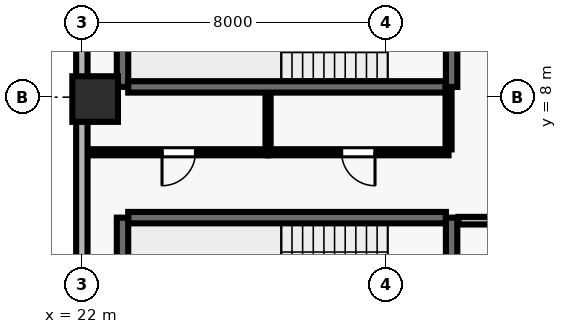
"""IFC4 building model, lengths in metres.
Left out: names, types, materials, properties, quantities, classifications, styles, units other than length and angle.
Written with IfcOpenShell. Run it as: python <this file> out.ifc"""

import sys

from ifc_helpers import new_model, si_unit, direction, frame, frame_2d, origin, origin_2d, place, context, subcontext, project, spatial, rectangle, extrude, element, fill, save


model = new_model("IFC4")
c1 = context("Model", 3, precision=1e-05, world=origin(), true_north=direction((0.0, 1.0)))
c2 = subcontext(c1, "Body", "Model", "MODEL_VIEW")
j1 = project(units=[si_unit("LENGTHUNIT", "METRE"), si_unit("PLANEANGLEUNIT", "RADIAN")], contexts=[c1])
p1 = place(None, origin())
s1 = spatial("IfcSite", under=j1, at=p1, CompositionType="ELEMENT")
p2 = place(p1, origin())
s2 = spatial("IfcBuilding", under=s1, at=p2, CompositionType="ELEMENT")
p3 = place(p2, frame((0.0, 0.0, 138.5)))
s3 = spatial("IfcBuildingStorey", under=s2, at=p3, CompositionType="ELEMENT", Elevation=138.5)
p4 = place(p3, frame((22.35, 7.95, 0.0), z_axis=(0.0, 0.0, 1.0), x_axis=(1.0, 0.0, 0.0)))
e1 = element("IfcColumn", 1, at=p4, inside=s3, PredefinedType="COLUMN", context=c2, shape_type="SweptSolid", body=[
    extrude(rectangle(XDim=1.2, YDim=1.2, at=origin_2d()), origin(), (0.0, 0.0, 1.0), 3.9),
])
p5 = place(p3, frame((22.0, 46.1, 0.0), z_axis=(0.0, 0.0, 1.0), x_axis=(0.0, -1.0, 0.0)))
e2 = element("IfcWall", 2, at=p5, inside=s3, PredefinedType="SOLIDWALL", context=c2, shape_type="SweptSolid", body=[
    extrude(rectangle(XDim=43.6, YDim=0.3, at=frame_2d((21.8, 0.0))), origin(), (0.0, 0.0, 1.0), 3.69),
])
p6 = place(p5, frame((12.7, 0.0, 0.0)))
e3 = element("IfcOpeningElement", 3, at=p6, cuts=e2, PredefinedType="OPENING", context=c2, shape_type="SweptSolid", body=[
    extrude(rectangle(XDim=1.0, YDim=2.2, at=frame_2d((0.5, 1.1))), frame((0.0, 0.16, 0.0), z_axis=(0.0, -1.0, 0.0), x_axis=(1.0, 0.0, 0.0)), (0.0, 0.0, 1.0), 0.32),
])
p7 = place(p5, frame((1.825, 0.0, 0.9)))
e4 = element("IfcOpeningElement", 4, at=p7, cuts=e2, PredefinedType="OPENING", context=c2, shape_type="SweptSolid", body=[
    extrude(rectangle(XDim=1.8, YDim=2.2, at=frame_2d((0.9, 1.1))), frame((0.0, 0.16, 0.0), z_axis=(0.0, -1.0, 0.0), x_axis=(1.0, 0.0, 0.0)), (0.0, 0.0, 1.0), 0.32),
])
p8 = place(p5, frame((17.725, 0.0, 0.9)))
e5 = element("IfcOpeningElement", 5, at=p8, cuts=e2, PredefinedType="OPENING", context=c2, shape_type="SweptSolid", body=[
    extrude(rectangle(XDim=1.8, YDim=2.2, at=frame_2d((0.9, 1.1))), frame((0.0, 0.16, 0.0), z_axis=(0.0, -1.0, 0.0), x_axis=(1.0, 0.0, 0.0)), (0.0, 0.0, 1.0), 0.32),
])
p9 = place(p5, frame((23.625, 0.0, 0.9)))
e6 = element("IfcOpeningElement", 6, at=p9, cuts=e2, PredefinedType="OPENING", context=c2, shape_type="SweptSolid", body=[
    extrude(rectangle(XDim=1.8, YDim=2.2, at=frame_2d((0.9, 1.1))), frame((0.0, 0.16, 0.0), z_axis=(0.0, -1.0, 0.0), x_axis=(1.0, 0.0, 0.0)), (0.0, 0.0, 1.0), 0.32),
])
p10 = place(p5, frame((28.625, 0.0, 0.9)))
e7 = element("IfcOpeningElement", 7, at=p10, cuts=e2, PredefinedType="OPENING", context=c2, shape_type="SweptSolid", body=[
    extrude(rectangle(XDim=1.8, YDim=2.2, at=frame_2d((0.9, 1.1))), frame((0.0, 0.16, 0.0), z_axis=(0.0, -1.0, 0.0), x_axis=(1.0, 0.0, 0.0)), (0.0, 0.0, 1.0), 0.32),
])
p11 = place(p5, frame((34.525, 0.0, 0.9)))
e8 = element("IfcOpeningElement", 8, at=p11, cuts=e2, PredefinedType="OPENING", context=c2, shape_type="SweptSolid", body=[
    extrude(rectangle(XDim=1.8, YDim=2.2, at=frame_2d((0.9, 1.1))), frame((0.0, 0.16, 0.0), z_axis=(0.0, -1.0, 0.0), x_axis=(1.0, 0.0, 0.0)), (0.0, 0.0, 1.0), 0.32),
])
p12 = place(p3, frame((31.58, 4.83, 0.0), z_axis=(0.0, 0.0, 1.0), x_axis=(-1.0, 0.0, 0.0)))
e9 = element("IfcWall", 9, at=p12, inside=s3, PredefinedType="SHEAR", context=c2, shape_type="SweptSolid", body=[
    extrude(rectangle(XDim=8.36, YDim=0.3, at=frame_2d((4.18, 0.0))), origin(), (0.0, 0.0, 1.0), 3.69),
])
p13 = place(p3, frame((23.07, 4.83, 0.0), z_axis=(0.0, 0.0, 1.0), x_axis=(0.0, -1.0, 0.0)))
e10 = element("IfcWall", 10, at=p13, inside=s3, PredefinedType="SHEAR", context=c2, shape_type="SweptSolid", body=[
    extrude(rectangle(XDim=3.51, YDim=0.3, at=frame_2d((1.755, 0.0))), origin(), (0.0, 0.0, 1.0), 3.69),
])
p14 = place(p3, frame((31.73, 0.96, 0.0), z_axis=(0.0, 0.0, 1.0), x_axis=(0.0, 1.0, 0.0)))
e11 = element("IfcWall", 11, at=p14, inside=s3, PredefinedType="SHEAR", context=c2, shape_type="SweptSolid", body=[
    extrude(rectangle(XDim=3.87, YDim=0.3, at=frame_2d((1.935, 0.0))), origin(), (0.0, 0.0, 1.0), 3.69),
])
p15 = place(p14, frame((1.54, 0.0, 0.0)))
e12 = element("IfcOpeningElement", 12, at=p15, cuts=e11, PredefinedType="OPENING", context=c2, shape_type="SweptSolid", body=[
    extrude(rectangle(XDim=1.15, YDim=2.15, at=frame_2d((0.575, 1.075))), frame((0.0, 0.16, 0.0), z_axis=(0.0, -1.0, 0.0), x_axis=(1.0, 0.0, 0.0)), (0.0, 0.0, 1.0), 0.32),
])
p16 = place(p3, frame((23.07, 11.78, 0.0), z_axis=(0.0, 0.0, 1.0), x_axis=(0.0, -1.0, 0.0)))
e13 = element("IfcWall", 13, at=p16, inside=s3, PredefinedType="SHEAR", context=c2, shape_type="SweptSolid", body=[
    extrude(rectangle(XDim=3.51, YDim=0.3, at=frame_2d((1.755, 0.0))), origin(), (0.0, 0.0, 1.0), 3.69),
])
p17 = place(p3, frame((23.22, 8.27, 0.0), z_axis=(0.0, 0.0, 1.0), x_axis=(1.0, 0.0, 0.0)))
e14 = element("IfcWall", 14, at=p17, inside=s3, PredefinedType="SHEAR", context=c2, shape_type="SweptSolid", body=[
    extrude(rectangle(XDim=8.36, YDim=0.3, at=frame_2d((4.18, 0.0))), origin(), (0.0, 0.0, 1.0), 3.69),
])
p18 = place(p3, frame((31.73, 8.27, 0.0), z_axis=(0.0, 0.0, 1.0), x_axis=(0.0, 1.0, 0.0)))
e15 = element("IfcWall", 15, at=p18, inside=s3, PredefinedType="SHEAR", context=c2, shape_type="SweptSolid", body=[
    extrude(rectangle(XDim=3.51, YDim=0.3, at=frame_2d((1.755, 0.0))), origin(), (0.0, 0.0, 1.0), 3.69),
])
p19 = place(p18, frame((1.18, 0.0, 0.0)))
e16 = element("IfcOpeningElement", 16, at=p19, cuts=e15, PredefinedType="OPENING", context=c2, shape_type="SweptSolid", body=[
    extrude(rectangle(XDim=1.15, YDim=2.15, at=frame_2d((0.575, 1.075))), frame((0.0, 0.16, 0.0), z_axis=(0.0, -1.0, 0.0), x_axis=(1.0, 0.0, 0.0)), (0.0, 0.0, 1.0), 0.32),
])
p20 = place(p3, frame((26.9, 6.55, 0.0), z_axis=(0.0, 0.0, 1.0), x_axis=(-1.0, 0.0, 0.0)))
e17 = element("IfcWall", 17, at=p20, inside=s3, PredefinedType="PARTITIONING", context=c2, shape_type="SweptSolid", body=[
    extrude(rectangle(XDim=4.7, YDim=0.16, at=frame_2d((2.35, 0.0))), origin(), (0.0, 0.0, 1.0), 3.69),
])
p21 = place(p20, frame((1.91, 0.0, 0.0)))
e18 = element("IfcOpeningElement", 18, at=p21, cuts=e17, PredefinedType="OPENING", context=c2, shape_type="SweptSolid", body=[
    extrude(rectangle(XDim=0.88, YDim=2.1, at=frame_2d((0.44, 1.05))), frame((0.0, 0.09, 0.0), z_axis=(0.0, -1.0, 0.0), x_axis=(1.0, 0.0, 0.0)), (0.0, 0.0, 1.0), 0.18),
])
p22 = place(p3, frame((31.65, 6.55, 0.0), z_axis=(0.0, 0.0, 1.0), x_axis=(-1.0, 0.0, 0.0)))
e19 = element("IfcWall", 19, at=p22, inside=s3, PredefinedType="PARTITIONING", context=c2, shape_type="SweptSolid", body=[
    extrude(rectangle(XDim=4.75, YDim=0.16, at=frame_2d((2.375, 0.0))), origin(), (0.0, 0.0, 1.0), 3.69),
])
p23 = place(p22, frame((1.935, 0.0, 0.0)))
e20 = element("IfcOpeningElement", 20, at=p23, cuts=e19, PredefinedType="OPENING", context=c2, shape_type="SweptSolid", body=[
    extrude(rectangle(XDim=0.88, YDim=2.1, at=frame_2d((0.44, 1.05))), frame((0.0, 0.09, 0.0), z_axis=(0.0, -1.0, 0.0), x_axis=(1.0, 0.0, 0.0)), (0.0, 0.0, 1.0), 0.18),
])
p24 = place(p3, frame((35.02, 4.75, 0.0), z_axis=(0.0, 0.0, 1.0), x_axis=(-1.0, 0.0, 0.0)))
e21 = element("IfcWall", 21, at=p24, inside=s3, PredefinedType="SOLIDWALL", context=c2, shape_type="SweptSolid", body=[
    extrude(rectangle(XDim=3.11, YDim=0.2, at=frame_2d((1.555, 0.0))), origin(), (0.0, 0.0, 1.0), 3.69),
])
p25 = place(p24, frame((1.03, 0.0, 0.0)))
e22 = element("IfcOpeningElement", 22, at=p25, cuts=e21, PredefinedType="OPENING", context=c2, shape_type="SweptSolid", body=[
    extrude(rectangle(XDim=1.05, YDim=2.15, at=frame_2d((0.525, 1.075))), frame((0.0, 0.11, 0.0), z_axis=(0.0, -1.0, 0.0), x_axis=(1.0, 0.0, 0.0)), (0.0, 0.0, 1.0), 0.22),
])
p26 = place(p3, frame((26.9, 6.625, 0.0), z_axis=(0.0, 0.0, 1.0), x_axis=(0.0, 1.0, 0.0)))
e23 = element("IfcWall", 23, at=p26, inside=s3, PredefinedType="PARTITIONING", context=c2, shape_type="SweptSolid", body=[
    extrude(rectangle(XDim=1.465, YDim=0.135, at=frame_2d((0.732, 0.0))), origin(), (0.0, 0.0, 1.0), 3.69),
])
p27 = place(p3, frame((31.65, 8.24, 0.0), z_axis=(0.0, 0.0, 1.0), x_axis=(0.0, -1.0, 0.0)))
e24 = element("IfcWall", 24, at=p27, inside=s3, PredefinedType="PARTITIONING", context=c2, shape_type="SweptSolid", body=[
    extrude(rectangle(XDim=1.615, YDim=0.16, at=frame_2d((0.808, 0.0))), origin(), (0.0, 0.0, 1.0), 3.69),
])
p28 = place(p21, origin())
e25 = element("IfcDoor", 25, at=p28, inside=s3, OperationType="SINGLE_SWING_RIGHT", PredefinedType="DOOR", context=c2, shape_type="SweptSolid", body=[
    extrude(rectangle(XDim=0.88, YDim=2.1, at=frame_2d((0.44, 1.05))), frame((0.0, 0.025, 0.0), z_axis=(0.0, -1.0, 0.0), x_axis=(1.0, 0.0, 0.0)), (0.0, 0.0, 1.0), 0.05),
])
fill(e18, e25)
p29 = place(p23, origin())
e26 = element("IfcDoor", 26, at=p29, inside=s3, OperationType="SINGLE_SWING_LEFT", PredefinedType="DOOR", context=c2, shape_type="SweptSolid", body=[
    extrude(rectangle(XDim=0.88, YDim=2.1, at=frame_2d((0.44, 1.05))), frame((0.0, 0.025, 0.0), z_axis=(0.0, -1.0, 0.0), x_axis=(1.0, 0.0, 0.0)), (0.0, 0.0, 1.0), 0.05),
])
fill(e20, e26)
save(model, sys.argv[1])
